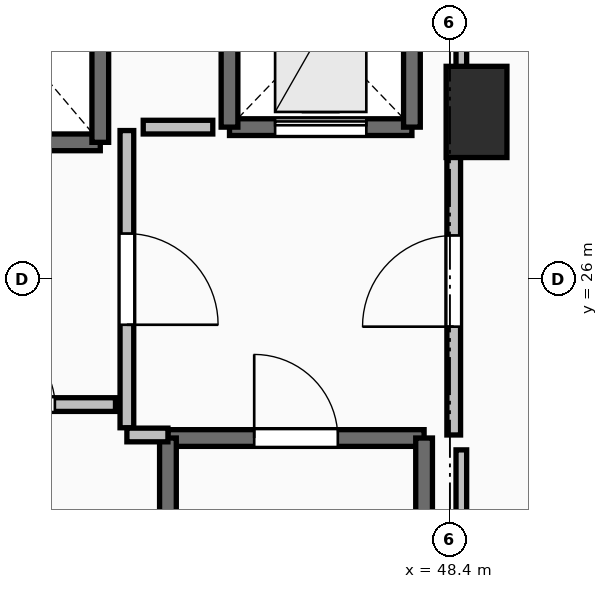
"""IFC4 building model, lengths in metres.
Left out: names, types, materials, properties, quantities, classifications, styles, units other than length and angle.
Written with IfcOpenShell. Run it as: python <this file> out.ifc"""

import sys

from ifc_helpers import new_model, si_unit, direction, frame, frame_2d, origin, origin_2d, place, context, subcontext, project, spatial, rectangle, extrude, element, fill, save


model = new_model("IFC4")
c1 = context("Model", 3, precision=1e-05, world=origin(), true_north=direction((0.0, 1.0)))
c2 = subcontext(c1, "Body", "Model", "MODEL_VIEW")
j1 = project(units=[si_unit("LENGTHUNIT", "METRE"), si_unit("PLANEANGLEUNIT", "RADIAN")], contexts=[c1])
p1 = place(None, origin())
s1 = spatial("IfcSite", under=j1, at=p1, CompositionType="ELEMENT")
p2 = place(p1, origin())
s2 = spatial("IfcBuilding", under=s1, at=p2, CompositionType="ELEMENT")
p3 = place(p2, frame((0.0, 0.0, 19.2)))
s3 = spatial("IfcBuildingStorey", under=s2, at=p3, CompositionType="ELEMENT", Elevation=19.2)
p4 = place(p3, frame((48.75, 28.2, 0.0), z_axis=(0.0, 0.0, 1.0), x_axis=(1.0, 0.0, 0.0)))
e1 = element("IfcColumn", 1, at=p4, inside=s3, PredefinedType="PILASTER", context=c2, shape_type="SweptSolid", body=[
    extrude(rectangle(XDim=0.8, YDim=1.2, at=origin_2d()), origin(), (0.0, 0.0, 1.0), 4.8),
])
p5 = place(p3, frame((44.69, 23.91, 0.0), z_axis=(0.0, 0.0, 1.0), x_axis=(1.0, 0.0, 0.0)))
e2 = element("IfcWall", 2, at=p5, inside=s3, PredefinedType="SOLIDWALL", context=c2, shape_type="SweptSolid", body=[
    extrude(rectangle(XDim=3.37, YDim=0.22, at=frame_2d((1.685, 0.0))), origin(), (0.0, 0.0, 1.0), 4.54),
])
p6 = place(p5, frame((1.135, 0.0, 0.0)))
e3 = element("IfcOpeningElement", 3, at=p6, cuts=e2, PredefinedType="OPENING", context=c2, shape_type="SweptSolid", body=[
    extrude(rectangle(XDim=1.1, YDim=2.15, at=frame_2d((0.55, 1.075))), frame((0.0, 0.125, 0.0), z_axis=(0.0, -1.0, 0.0), x_axis=(1.0, 0.0, 0.0)), (0.0, 0.0, 1.0), 0.25),
])
for number, where, z_axis, x_axis in (
    (4, (48.06, 23.91, 0.0), (0.0, 0.0, 1.0), (0.0, -1.0, 0.0)),
    (5, (44.69, 16.49, 0.0), (0.0, 0.0, 1.0), (0.0, 1.0, 0.0)),
):
    element("IfcWall", number, at=place(p3, frame(where, z_axis=z_axis, x_axis=x_axis)), inside=s3, PredefinedType="SOLIDWALL", context=c2, shape_type="SweptSolid", body=[
        extrude(rectangle(XDim=7.42, YDim=0.22, at=frame_2d((3.71, 0.0))), origin(), (0.0, 0.0, 1.0), 4.54),
    ])
p7 = place(p3, frame((41.6, 27.8, 0.0), z_axis=(0.0, 0.0, 1.0), x_axis=(1.0, 0.0, 0.0)))
e6 = element("IfcWall", 6, at=p7, inside=s3, PredefinedType="SOLIDWALL", context=c2, shape_type="SweptSolid", body=[
    extrude(rectangle(XDim=2.2, YDim=0.22, at=frame_2d((1.1, 0.0))), origin(), (0.0, 0.0, 1.0), 4.54),
])
p8 = place(p3, frame((43.8, 27.8, 0.0), z_axis=(0.0, 0.0, 1.0), x_axis=(0.0, 1.0, 0.0)))
e7 = element("IfcWall", 7, at=p8, inside=s3, PredefinedType="SOLIDWALL", context=c2, shape_type="SweptSolid", body=[
    extrude(rectangle(XDim=2.6, YDim=0.22, at=frame_2d((1.3, 0.0))), origin(), (0.0, 0.0, 1.0), 4.54),
])
p9 = place(p3, frame((45.5, 28.0, 0.0), z_axis=(0.0, 0.0, 1.0), x_axis=(1.0, 0.0, 0.0)))
e8 = element("IfcWall", 8, at=p9, inside=s3, PredefinedType="SHEAR", context=c2, shape_type="SweptSolid", body=[
    extrude(rectangle(XDim=2.4, YDim=0.22, at=frame_2d((1.2, 0.0))), origin(), (0.0, 0.0, 1.0), 4.54),
])
p10 = place(p9, frame((0.6, 0.0, 0.0)))
e9 = element("IfcOpeningElement", 9, at=p10, cuts=e8, PredefinedType="OPENING", context=c2, shape_type="SweptSolid", body=[
    extrude(rectangle(XDim=1.2, YDim=2.2, at=frame_2d((0.6, 1.1))), frame((0.0, 0.125, 0.0), z_axis=(0.0, -1.0, 0.0), x_axis=(1.0, 0.0, 0.0)), (0.0, 0.0, 1.0), 0.25),
])
for number, where, z_axis, x_axis in (
    (10, (47.9, 28.0, 0.0), (0.0, 0.0, 1.0), (0.0, 1.0, 0.0)),
    (11, (45.5, 30.5, 0.0), (0.0, 0.0, 1.0), (0.0, -1.0, 0.0)),
):
    element("IfcWall", number, at=place(p3, frame(where, z_axis=z_axis, x_axis=x_axis)), inside=s3, PredefinedType="SHEAR", context=c2, shape_type="SweptSolid", body=[
        extrude(rectangle(XDim=2.5, YDim=0.22, at=frame_2d((1.25, 0.0))), origin(), (0.0, 0.0, 1.0), 4.54),
    ])
p11 = place(p3, frame((44.15, 27.955, 0.0), z_axis=(0.0, 0.0, 1.0), x_axis=(0.0, -1.0, 0.0)))
e12 = element("IfcWall", 12, at=p11, inside=s3, PredefinedType="PARTITIONING", context=c2, shape_type="SweptSolid", body=[
    extrude(rectangle(XDim=3.91, YDim=0.18, at=frame_2d((1.955, 0.0))), origin(), (0.0, 0.0, 1.0), 4.54),
])
p12 = place(p11, frame((1.355, 0.0, 0.0)))
e13 = element("IfcOpeningElement", 13, at=p12, cuts=e12, PredefinedType="OPENING", context=c2, shape_type="SweptSolid", body=[
    extrude(rectangle(XDim=1.2, YDim=2.15, at=frame_2d((0.6, 1.075))), frame((0.0, 0.105, 0.0), z_axis=(0.0, -1.0, 0.0), x_axis=(1.0, 0.0, 0.0)), (0.0, 0.0, 1.0), 0.21),
])
p13 = place(p3, frame((44.15, 23.95, 0.0), z_axis=(0.0, 0.0, 1.0), x_axis=(1.0, 0.0, 0.0)))
e14 = element("IfcWall", 14, at=p13, inside=s3, PredefinedType="PARTITIONING", context=c2, shape_type="SweptSolid", body=[
    extrude(rectangle(XDim=0.54, YDim=0.18, at=frame_2d((0.27, 0.0))), origin(), (0.0, 0.0, 1.0), 4.54),
])
p14 = place(p3, frame((48.45, 23.95, 0.0), z_axis=(0.0, 0.0, 1.0), x_axis=(0.0, 1.0, 0.0)))
e15 = element("IfcWall", 15, at=p14, inside=s3, PredefinedType="PARTITIONING", context=c2, shape_type="SweptSolid", body=[
    extrude(rectangle(XDim=4.05, YDim=0.18, at=frame_2d((2.025, 0.0))), origin(), (0.0, 0.0, 1.0), 4.54),
])
p15 = place(p14, frame((1.425, 0.0, 0.0)))
e16 = element("IfcOpeningElement", 16, at=p15, cuts=e15, PredefinedType="OPENING", context=c2, shape_type="SweptSolid", body=[
    extrude(rectangle(XDim=1.2, YDim=2.15, at=frame_2d((0.6, 1.075))), frame((0.0, 0.105, 0.0), z_axis=(0.0, -1.0, 0.0), x_axis=(1.0, 0.0, 0.0)), (0.0, 0.0, 1.0), 0.21),
])
p16 = place(p3, frame((41.555, 24.35, 0.0), z_axis=(0.0, 0.0, 1.0), x_axis=(1.0, 0.0, 0.0)))
e17 = element("IfcWall", 17, at=p16, inside=s3, PredefinedType="PARTITIONING", context=c2, shape_type="SweptSolid", body=[
    extrude(rectangle(XDim=2.445, YDim=0.18, at=frame_2d((1.223, 0.0))), origin(), (0.0, 0.0, 1.0), 4.54),
])
p17 = place(p16, frame((0.798, 0.0, 0.0)))
e18 = element("IfcOpeningElement", 18, at=p17, cuts=e17, PredefinedType="OPENING", context=c2, shape_type="SweptSolid", body=[
    extrude(rectangle(XDim=0.85, YDim=2.1, at=frame_2d((0.425, 1.05))), frame((0.0, 0.105, 0.0), z_axis=(0.0, -1.0, 0.0), x_axis=(1.0, 0.0, 0.0)), (0.0, 0.0, 1.0), 0.21),
])
p18 = place(p3, frame((45.28, 28.0, 0.0), z_axis=(0.0, 0.0, 1.0), x_axis=(-1.0, 0.0, 0.0)))
e19 = element("IfcWall", 19, at=p18, inside=s3, PredefinedType="PARTITIONING", context=c2, shape_type="SweptSolid", body=[
    extrude(rectangle(XDim=0.915, YDim=0.18, at=frame_2d((0.458, 0.0))), origin(), (0.0, 0.0, 1.0), 4.54),
])
p19 = place(p3, frame((48.55, 33.45, 0.0), z_axis=(0.0, 0.0, 1.0), x_axis=(0.0, -1.0, 0.0)))
e20 = element("IfcWall", 20, at=p19, inside=s3, PredefinedType="PARTITIONING", context=c2, shape_type="SweptSolid", body=[
    extrude(rectangle(XDim=5.254, YDim=0.14, at=frame_2d((2.627, 0.0))), origin(), (0.0, 0.0, 1.0), 3.732),
])
p20 = place(p3, frame((48.55, 23.754, 0.0), z_axis=(0.0, 0.0, 1.0), x_axis=(0.0, -1.0, 0.0)))
e21 = element("IfcWall", 21, at=p20, inside=s3, PredefinedType="PARTITIONING", context=c2, shape_type="SweptSolid", body=[
    extrude(rectangle(XDim=7.514, YDim=0.14, at=frame_2d((3.757, 0.0))), origin(), (0.0, 0.0, 1.0), 3.732),
])
p21 = place(p6, origin())
e22 = element("IfcDoor", 22, at=p21, inside=s3, OperationType="SINGLE_SWING_LEFT", PredefinedType="DOOR", context=c2, shape_type="SweptSolid", body=[
    extrude(rectangle(XDim=1.1, YDim=2.15, at=frame_2d((0.55, 1.075))), frame((0.0, 0.025, 0.0), z_axis=(0.0, -1.0, 0.0), x_axis=(1.0, 0.0, 0.0)), (0.0, 0.0, 1.0), 0.05),
])
fill(e3, e22)
p22 = place(p10, origin())
e23 = element("IfcDoor", 23, at=p22, inside=s3, OperationType="SLIDING_TO_LEFT", PredefinedType="DOOR", context=c2, shape_type="SweptSolid", body=[
    extrude(rectangle(XDim=1.2, YDim=2.2, at=frame_2d((0.6, 1.1))), frame((0.0, 0.025, 0.0), z_axis=(0.0, -1.0, 0.0), x_axis=(1.0, 0.0, 0.0)), (0.0, 0.0, 1.0), 0.05),
])
fill(e9, e23)
p23 = place(p12, origin())
e24 = element("IfcDoor", 24, at=p23, inside=s3, OperationType="SINGLE_SWING_RIGHT", PredefinedType="DOOR", context=c2, shape_type="SweptSolid", body=[
    extrude(rectangle(XDim=1.2, YDim=2.15, at=frame_2d((0.6, 1.075))), frame((0.0, 0.025, 0.0), z_axis=(0.0, -1.0, 0.0), x_axis=(1.0, 0.0, 0.0)), (0.0, 0.0, 1.0), 0.05),
])
fill(e13, e24)
p24 = place(p15, origin())
e25 = element("IfcDoor", 25, at=p24, inside=s3, OperationType="SINGLE_SWING_LEFT", PredefinedType="DOOR", context=c2, shape_type="SweptSolid", body=[
    extrude(rectangle(XDim=1.2, YDim=2.15, at=frame_2d((0.6, 1.075))), frame((0.0, 0.025, 0.0), z_axis=(0.0, -1.0, 0.0), x_axis=(1.0, 0.0, 0.0)), (0.0, 0.0, 1.0), 0.05),
])
fill(e16, e25)
p25 = place(p17, origin())
e26 = element("IfcDoor", 26, at=p25, inside=s3, OperationType="SINGLE_SWING_LEFT", PredefinedType="DOOR", context=c2, shape_type="SweptSolid", body=[
    extrude(rectangle(XDim=0.85, YDim=2.1, at=frame_2d((0.425, 1.05))), frame((0.0, 0.025, 0.0), z_axis=(0.0, -1.0, 0.0), x_axis=(1.0, 0.0, 0.0)), (0.0, 0.0, 1.0), 0.05),
])
fill(e18, e26)
save(model, sys.argv[1])
